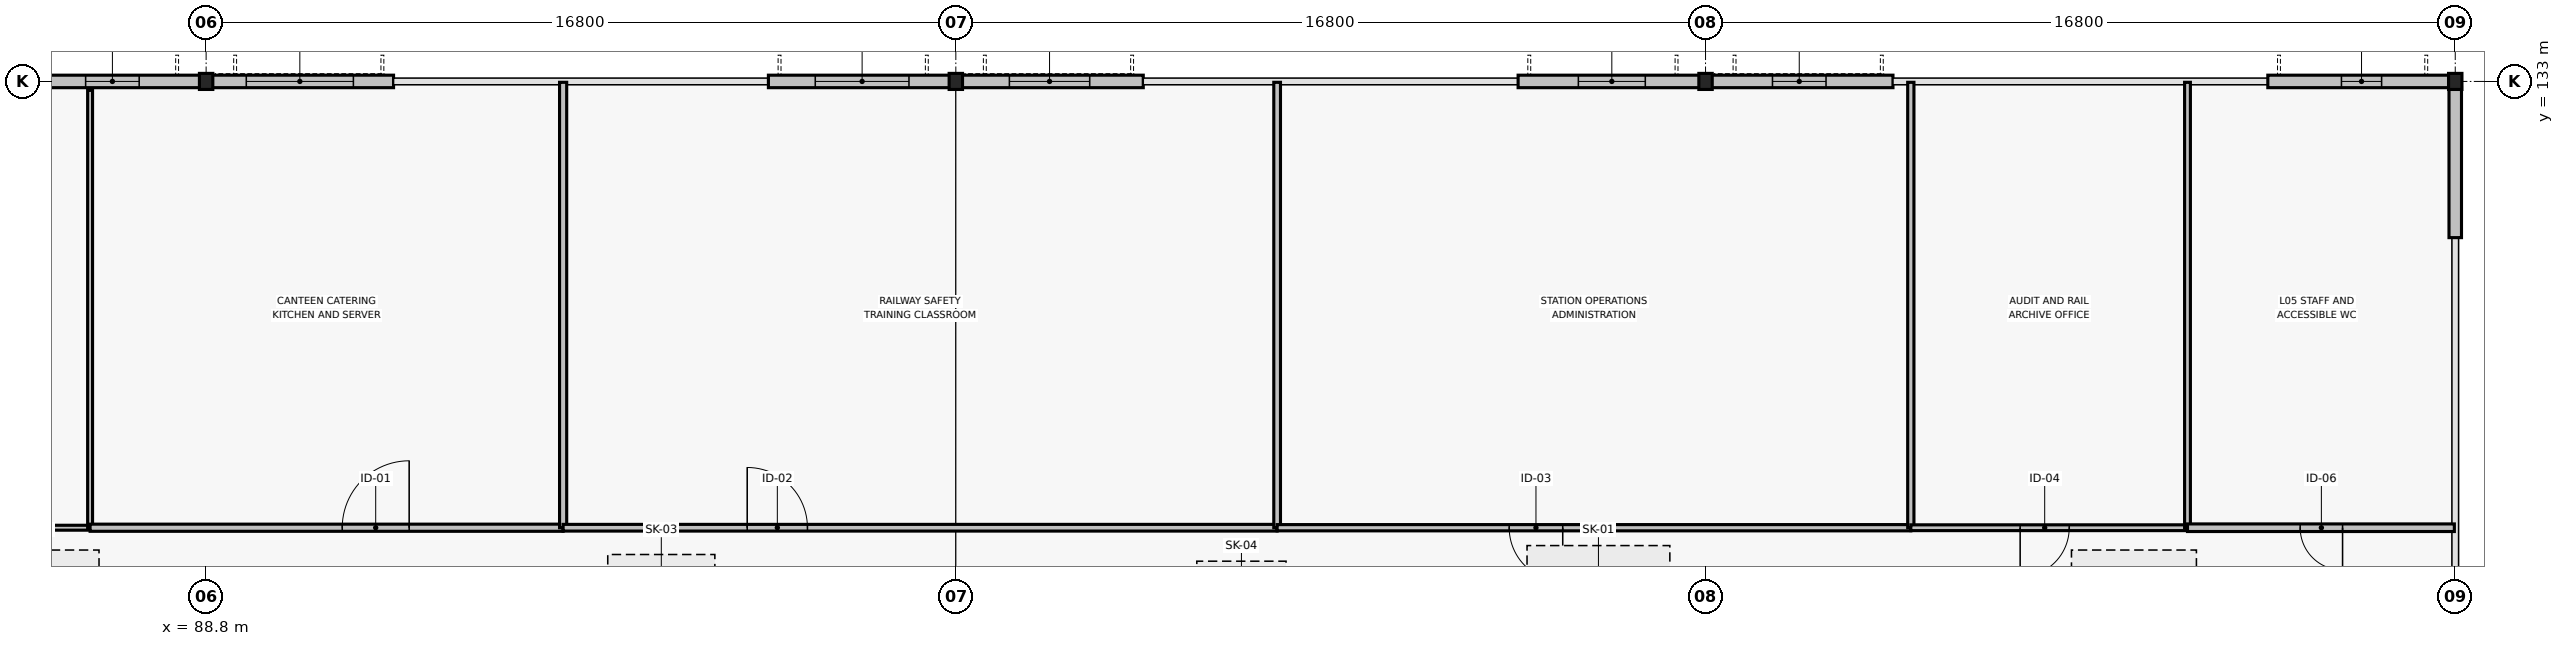
"""IFC4 building model, lengths in metres.
Left out: names, types, materials, properties, quantities, classifications, styles, units other than length and angle.
Written with IfcOpenShell. Run it as: python <this file> out.ifc"""

import sys

from ifc_helpers import new_model, si_unit, direction, frame, frame_2d, origin, origin_2d, place, context, subcontext, project, spatial, rectangle, i_section, extrude, element, fill, save


model = new_model("IFC4")
c1 = context("Model", 3, precision=1e-05, world=origin(), true_north=direction((0.0, 1.0)))
c2 = subcontext(c1, "Body", "Model", "MODEL_VIEW")
j1 = project(units=[si_unit("LENGTHUNIT", "METRE"), si_unit("PLANEANGLEUNIT", "RADIAN")], contexts=[c1])
p1 = place(None, origin())
s1 = spatial("IfcSite", under=j1, at=p1, CompositionType="ELEMENT")
p2 = place(p1, origin())
s2 = spatial("IfcBuilding", under=s1, at=p2, CompositionType="ELEMENT")
p3 = place(p2, frame((0.0, 0.0, 24.9)))
s3 = spatial("IfcBuildingStorey", under=s2, at=p3, CompositionType="ELEMENT", Elevation=24.9)
for number, where, z_axis, x_axis in (
    (1, (88.8, 133.0, 0.0), (0.0, 0.0, 1.0), (1.0, 0.0, 0.0)),
    (2, (105.6, 133.0, 0.0), (0.0, 0.0, 1.0), (1.0, 0.0, 0.0)),
    (3, (122.4, 133.0, 0.0), (0.0, 0.0, 1.0), (1.0, 0.0, 0.0)),
    (4, (139.2, 133.0, 0.0), (0.0, 0.0, 1.0), (1.0, 0.0, 0.0)),
):
    element("IfcColumn", number, at=place(p3, frame(where, z_axis=z_axis, x_axis=x_axis)), inside=s3, PredefinedType="COLUMN", context=c2, shape_type="SweptSolid", body=[
        extrude(i_section(OverallWidth=0.3, OverallDepth=0.36, WebThickness=0.012, FlangeThickness=0.022, FilletRadius=0.027, at=origin_2d()), origin(), (0.0, 0.0, 1.0), 3.9),
    ])
p4 = place(p3, frame((84.6, 133.0, 0.0), z_axis=(0.0, 0.0, 1.0), x_axis=(1.0, 0.0, 0.0)))
e5 = element("IfcWall", 5, at=p4, inside=s3, PredefinedType="STANDARD", context=c2, shape_type="SweptSolid", body=[
    extrude(rectangle(XDim=4.2, YDim=0.28, at=frame_2d((2.1, 0.0))), origin(), (0.0, 0.0, 1.0), 3.3),
])
p5 = place(p4, frame((1.5, 0.0, 0.8)))
e6 = element("IfcOpeningElement", 6, at=p5, cuts=e5, PredefinedType="OPENING", context=c2, shape_type="SweptSolid", body=[
    extrude(rectangle(XDim=1.2, YDim=1.9, at=frame_2d((0.6, 0.95))), frame((0.0, 0.15, 0.0), z_axis=(0.0, -1.0, 0.0), x_axis=(1.0, 0.0, 0.0)), (0.0, 0.0, 1.0), 0.3),
])
p6 = place(p3, frame((88.8, 133.0, 0.0), z_axis=(0.0, 0.0, 1.0), x_axis=(1.0, 0.0, 0.0)))
e7 = element("IfcWall", 7, at=p6, inside=s3, PredefinedType="STANDARD", context=c2, shape_type="SweptSolid", body=[
    extrude(rectangle(XDim=4.2, YDim=0.28, at=frame_2d((2.1, 0.0))), origin(), (0.0, 0.0, 1.0), 3.3),
])
p7 = place(p6, frame((0.9, 0.0, 0.8)))
e8 = element("IfcOpeningElement", 8, at=p7, cuts=e7, PredefinedType="OPENING", context=c2, shape_type="SweptSolid", body=[
    extrude(rectangle(XDim=2.4, YDim=1.75, at=frame_2d((1.2, 0.875))), frame((0.0, 0.15, 0.0), z_axis=(0.0, -1.0, 0.0), x_axis=(1.0, 0.0, 0.0)), (0.0, 0.0, 1.0), 0.3),
])
p8 = place(p3, frame((101.4, 133.0, 0.0), z_axis=(0.0, 0.0, 1.0), x_axis=(1.0, 0.0, 0.0)))
e9 = element("IfcWall", 9, at=p8, inside=s3, PredefinedType="STANDARD", context=c2, shape_type="SweptSolid", body=[
    extrude(rectangle(XDim=4.2, YDim=0.28, at=frame_2d((2.1, 0.0))), origin(), (0.0, 0.0, 1.0), 3.3),
])
p9 = place(p8, frame((1.05, 0.0, 0.8)))
e10 = element("IfcOpeningElement", 10, at=p9, cuts=e9, PredefinedType="OPENING", context=c2, shape_type="SweptSolid", body=[
    extrude(rectangle(XDim=2.1, YDim=1.75, at=frame_2d((1.05, 0.875))), frame((0.0, 0.15, 0.0), z_axis=(0.0, -1.0, 0.0), x_axis=(1.0, 0.0, 0.0)), (0.0, 0.0, 1.0), 0.3),
])
p10 = place(p3, frame((105.6, 133.0, 0.0), z_axis=(0.0, 0.0, 1.0), x_axis=(1.0, 0.0, 0.0)))
e11 = element("IfcWall", 11, at=p10, inside=s3, PredefinedType="STANDARD", context=c2, shape_type="SweptSolid", body=[
    extrude(rectangle(XDim=4.2, YDim=0.28, at=frame_2d((2.1, 0.0))), origin(), (0.0, 0.0, 1.0), 3.3),
])
p11 = place(p10, frame((1.2, 0.0, 0.8)))
e12 = element("IfcOpeningElement", 12, at=p11, cuts=e11, PredefinedType="OPENING", context=c2, shape_type="SweptSolid", body=[
    extrude(rectangle(XDim=1.8, YDim=1.75, at=frame_2d((0.9, 0.875))), frame((0.0, 0.15, 0.0), z_axis=(0.0, -1.0, 0.0), x_axis=(1.0, 0.0, 0.0)), (0.0, 0.0, 1.0), 0.3),
])
p12 = place(p3, frame((118.2, 133.0, 0.0), z_axis=(0.0, 0.0, 1.0), x_axis=(1.0, 0.0, 0.0)))
e13 = element("IfcWall", 13, at=p12, inside=s3, PredefinedType="STANDARD", context=c2, shape_type="SweptSolid", body=[
    extrude(rectangle(XDim=4.2, YDim=0.28, at=frame_2d((2.1, 0.0))), origin(), (0.0, 0.0, 1.0), 3.3),
])
p13 = place(p12, frame((1.35, 0.0, 0.8)))
e14 = element("IfcOpeningElement", 14, at=p13, cuts=e13, PredefinedType="OPENING", context=c2, shape_type="SweptSolid", body=[
    extrude(rectangle(XDim=1.5, YDim=1.75, at=frame_2d((0.75, 0.875))), frame((0.0, 0.15, 0.0), z_axis=(0.0, -1.0, 0.0), x_axis=(1.0, 0.0, 0.0)), (0.0, 0.0, 1.0), 0.3),
])
p14 = place(p3, frame((122.4, 133.0, 0.0), z_axis=(0.0, 0.0, 1.0), x_axis=(1.0, 0.0, 0.0)))
e15 = element("IfcWall", 15, at=p14, inside=s3, PredefinedType="STANDARD", context=c2, shape_type="SweptSolid", body=[
    extrude(rectangle(XDim=4.2, YDim=0.28, at=frame_2d((2.1, 0.0))), origin(), (0.0, 0.0, 1.0), 3.3),
])
p15 = place(p14, frame((1.5, 0.0, 0.8)))
e16 = element("IfcOpeningElement", 16, at=p15, cuts=e15, PredefinedType="OPENING", context=c2, shape_type="SweptSolid", body=[
    extrude(rectangle(XDim=1.2, YDim=1.75, at=frame_2d((0.6, 0.875))), frame((0.0, 0.15, 0.0), z_axis=(0.0, -1.0, 0.0), x_axis=(1.0, 0.0, 0.0)), (0.0, 0.0, 1.0), 0.3),
])
p16 = place(p3, frame((135.0, 133.0, 0.0), z_axis=(0.0, 0.0, 1.0), x_axis=(1.0, 0.0, 0.0)))
e17 = element("IfcWall", 17, at=p16, inside=s3, PredefinedType="STANDARD", context=c2, shape_type="SweptSolid", body=[
    extrude(rectangle(XDim=4.2, YDim=0.28, at=frame_2d((2.1, 0.0))), origin(), (0.0, 0.0, 1.0), 3.3),
])
p17 = place(p16, frame((1.65, 0.0, 0.8)))
e18 = element("IfcOpeningElement", 18, at=p17, cuts=e17, PredefinedType="OPENING", context=c2, shape_type="SweptSolid", body=[
    extrude(rectangle(XDim=0.9, YDim=1.75, at=frame_2d((0.45, 0.875))), frame((0.0, 0.15, 0.0), z_axis=(0.0, -1.0, 0.0), x_axis=(1.0, 0.0, 0.0)), (0.0, 0.0, 1.0), 0.3),
])
p18 = place(p3, frame((139.2, 129.5, 0.0), z_axis=(0.0, 0.0, 1.0), x_axis=(0.0, 1.0, 0.0)))
e19 = element("IfcWall", 19, at=p18, inside=s3, PredefinedType="STANDARD", context=c2, shape_type="SweptSolid", body=[
    extrude(rectangle(XDim=3.36, YDim=0.28, at=frame_2d((1.68, 0.0))), origin(), (0.0, 0.0, 1.0), 3.3),
])
p19 = place(p3, frame((72.2, 123.0, 0.0), z_axis=(0.0, 0.0, 1.0), x_axis=(1.0, 0.0, 0.0)))
e20 = element("IfcWall", 20, at=p19, inside=s3, PredefinedType="MOVABLE", context=c2, shape_type="SweptSolid", body=[
    extrude(rectangle(XDim=14.0, YDim=0.11, at=frame_2d((7.0, 0.0))), origin(), (0.0, 0.0, 1.0), 3.695),
])
p20 = place(p19, frame((6.36, 0.0, 0.0)))
e21 = element("IfcOpeningElement", 21, at=p20, cuts=e20, PredefinedType="OPENING", context=c2, shape_type="SweptSolid", body=[
    extrude(rectangle(XDim=1.28, YDim=2.22, at=frame_2d((0.64, 1.11))), frame((0.0, 0.065, 0.0), z_axis=(0.0, -1.0, 0.0), x_axis=(1.0, 0.0, 0.0)), (0.0, 0.0, 1.0), 0.13),
])
p21 = place(p3, frame((86.2, 123.0, 0.0), z_axis=(0.0, 0.0, 1.0), x_axis=(0.0, 1.0, 0.0)))
e22 = element("IfcWall", 22, at=p21, inside=s3, PredefinedType="MOVABLE", context=c2, shape_type="SweptSolid", body=[
    extrude(rectangle(XDim=9.8, YDim=0.11, at=frame_2d((4.9, 0.0))), origin(), (0.0, 0.0, 1.0), 3.695),
])
p22 = place(p3, frame((86.2, 123.0, 0.0), z_axis=(0.0, 0.0, 1.0), x_axis=(1.0, 0.0, 0.0)))
e23 = element("IfcWall", 23, at=p22, inside=s3, PredefinedType="PARTITIONING", context=c2, shape_type="SweptSolid", body=[
    extrude(rectangle(XDim=10.6, YDim=0.16, at=frame_2d((5.3, 0.0))), origin(), (0.0, 0.0, 1.0), 3.695),
])
p23 = place(p22, frame((7.15, 0.0, 0.0), z_axis=(0.0, 0.0, 1.0), x_axis=(-1.0, 0.0, 0.0)))
e24 = element("IfcOpeningElement", 24, at=p23, cuts=e23, PredefinedType="OPENING", context=c2, shape_type="SweptSolid", body=[
    extrude(rectangle(XDim=1.5, YDim=2.25, at=frame_2d((0.75, 1.125))), frame((0.0, 0.09, 0.0), z_axis=(0.0, -1.0, 0.0), x_axis=(1.0, 0.0, 0.0)), (0.0, 0.0, 1.0), 0.18),
])
p24 = place(p3, frame((96.8, 123.0, 0.0), z_axis=(0.0, 0.0, 1.0), x_axis=(0.0, 1.0, 0.0)))
e25 = element("IfcWall", 25, at=p24, inside=s3, PredefinedType="PARTITIONING", context=c2, shape_type="SweptSolid", body=[
    extrude(rectangle(XDim=9.98, YDim=0.16, at=frame_2d((4.99, 0.0))), origin(), (0.0, 0.0, 1.0), 3.695),
])
p25 = place(p3, frame((96.8, 123.0, 0.0), z_axis=(0.0, 0.0, 1.0), x_axis=(1.0, 0.0, 0.0)))
e26 = element("IfcWall", 26, at=p25, inside=s3, PredefinedType="PARTITIONING", context=c2, shape_type="SweptSolid", body=[
    extrude(rectangle(XDim=16.0, YDim=0.15, at=frame_2d((8.0, 0.0))), origin(), (0.0, 0.0, 1.0), 3.695),
])
p26 = place(p25, frame((4.125, 0.0, 0.0)))
e27 = element("IfcOpeningElement", 27, at=p26, cuts=e26, PredefinedType="OPENING", context=c2, shape_type="SweptSolid", body=[
    extrude(rectangle(XDim=1.35, YDim=2.2, at=frame_2d((0.675, 1.1))), frame((0.0, 0.085, 0.0), z_axis=(0.0, -1.0, 0.0), x_axis=(1.0, 0.0, 0.0)), (0.0, 0.0, 1.0), 0.17),
])
p27 = place(p3, frame((112.8, 123.0, 0.0), z_axis=(0.0, 0.0, 1.0), x_axis=(0.0, 1.0, 0.0)))
e28 = element("IfcWall", 28, at=p27, inside=s3, PredefinedType="PARTITIONING", context=c2, shape_type="SweptSolid", body=[
    extrude(rectangle(XDim=9.98, YDim=0.15, at=frame_2d((4.99, 0.0))), origin(), (0.0, 0.0, 1.0), 3.695),
])
p28 = place(p3, frame((112.8, 123.0, 0.0), z_axis=(0.0, 0.0, 1.0), x_axis=(1.0, 0.0, 0.0)))
e29 = element("IfcWall", 29, at=p28, inside=s3, PredefinedType="PARTITIONING", context=c2, shape_type="SweptSolid", body=[
    extrude(rectangle(XDim=14.2, YDim=0.14, at=frame_2d((7.1, 0.0))), origin(), (0.0, 0.0, 1.0), 3.695),
])
p29 = place(p28, frame((5.2, 0.0, 0.0)))
e30 = element("IfcOpeningElement", 30, at=p29, cuts=e29, PredefinedType="OPENING", context=c2, shape_type="SweptSolid", body=[
    extrude(rectangle(XDim=1.2, YDim=2.2, at=frame_2d((0.6, 1.1))), frame((0.0, 0.08, 0.0), z_axis=(0.0, -1.0, 0.0), x_axis=(1.0, 0.0, 0.0)), (0.0, 0.0, 1.0), 0.16),
])
p30 = place(p3, frame((127.0, 123.0, 0.0), z_axis=(0.0, 0.0, 1.0), x_axis=(0.0, 1.0, 0.0)))
e31 = element("IfcWall", 31, at=p30, inside=s3, PredefinedType="PARTITIONING", context=c2, shape_type="SweptSolid", body=[
    extrude(rectangle(XDim=9.98, YDim=0.14, at=frame_2d((4.99, 0.0))), origin(), (0.0, 0.0, 1.0), 3.695),
])
p31 = place(p3, frame((127.0, 123.0, 0.0), z_axis=(0.0, 0.0, 1.0), x_axis=(1.0, 0.0, 0.0)))
e32 = element("IfcWall", 32, at=p31, inside=s3, PredefinedType="PARTITIONING", context=c2, shape_type="SweptSolid", body=[
    extrude(rectangle(XDim=6.2, YDim=0.13, at=frame_2d((3.1, 0.0))), origin(), (0.0, 0.0, 1.0), 3.695),
])
p32 = place(p31, frame((3.55, 0.0, 0.0), z_axis=(0.0, 0.0, 1.0), x_axis=(-1.0, 0.0, 0.0)))
e33 = element("IfcOpeningElement", 33, at=p32, cuts=e32, PredefinedType="OPENING", context=c2, shape_type="SweptSolid", body=[
    extrude(rectangle(XDim=1.1, YDim=2.15, at=frame_2d((0.55, 1.075))), frame((0.0, 0.075, 0.0), z_axis=(0.0, -1.0, 0.0), x_axis=(1.0, 0.0, 0.0)), (0.0, 0.0, 1.0), 0.15),
])
p33 = place(p3, frame((133.2, 123.0, 0.0), z_axis=(0.0, 0.0, 1.0), x_axis=(0.0, 1.0, 0.0)))
e34 = element("IfcWall", 34, at=p33, inside=s3, PredefinedType="PARTITIONING", context=c2, shape_type="SweptSolid", body=[
    extrude(rectangle(XDim=9.98, YDim=0.13, at=frame_2d((4.99, 0.0))), origin(), (0.0, 0.0, 1.0), 3.36),
])
p34 = place(p3, frame((133.2, 123.0, 0.0), z_axis=(0.0, 0.0, 1.0), x_axis=(1.0, 0.0, 0.0)))
e35 = element("IfcWall", 35, at=p34, inside=s3, PredefinedType="PLUMBINGWALL", context=c2, shape_type="SweptSolid", body=[
    extrude(rectangle(XDim=5.98, YDim=0.17, at=frame_2d((2.99, 0.0))), origin(), (0.0, 0.0, 1.0), 3.695),
])
p35 = place(p34, frame((2.525, 0.0, 0.0)))
e36 = element("IfcOpeningElement", 36, at=p35, cuts=e35, PredefinedType="OPENING", context=c2, shape_type="SweptSolid", body=[
    extrude(rectangle(XDim=0.95, YDim=2.15, at=frame_2d((0.475, 1.075))), frame((0.0, 0.095, 0.0), z_axis=(0.0, -1.0, 0.0), x_axis=(1.0, 0.0, 0.0)), (0.0, 0.0, 1.0), 0.19),
])
p36 = place(p5, origin())
e37 = element("IfcWindow", 37, at=p36, inside=s3, PartitioningType="SINGLE_PANEL", PredefinedType="WINDOW", context=c2, shape_type="SweptSolid", body=[
    extrude(rectangle(XDim=1.2, YDim=1.9, at=frame_2d((0.6, 0.95))), frame((0.0, 0.03, 0.0), z_axis=(0.0, -1.0, 0.0), x_axis=(1.0, 0.0, 0.0)), (0.0, 0.0, 1.0), 0.06),
])
fill(e6, e37)
p37 = place(p7, origin())
e38 = element("IfcWindow", 38, at=p37, inside=s3, PartitioningType="SINGLE_PANEL", PredefinedType="WINDOW", context=c2, shape_type="SweptSolid", body=[
    extrude(rectangle(XDim=2.4, YDim=1.75, at=frame_2d((1.2, 0.875))), frame((0.0, 0.03, 0.0), z_axis=(0.0, -1.0, 0.0), x_axis=(1.0, 0.0, 0.0)), (0.0, 0.0, 1.0), 0.06),
])
fill(e8, e38)
p38 = place(p9, origin())
e39 = element("IfcWindow", 39, at=p38, inside=s3, PartitioningType="SINGLE_PANEL", PredefinedType="WINDOW", context=c2, shape_type="SweptSolid", body=[
    extrude(rectangle(XDim=2.1, YDim=1.75, at=frame_2d((1.05, 0.875))), frame((0.0, 0.03, 0.0), z_axis=(0.0, -1.0, 0.0), x_axis=(1.0, 0.0, 0.0)), (0.0, 0.0, 1.0), 0.06),
])
fill(e10, e39)
p39 = place(p11, origin())
e40 = element("IfcWindow", 40, at=p39, inside=s3, PartitioningType="SINGLE_PANEL", PredefinedType="WINDOW", context=c2, shape_type="SweptSolid", body=[
    extrude(rectangle(XDim=1.8, YDim=1.75, at=frame_2d((0.9, 0.875))), frame((0.0, 0.03, 0.0), z_axis=(0.0, -1.0, 0.0), x_axis=(1.0, 0.0, 0.0)), (0.0, 0.0, 1.0), 0.06),
])
fill(e12, e40)
p40 = place(p13, origin())
e41 = element("IfcWindow", 41, at=p40, inside=s3, PartitioningType="SINGLE_PANEL", PredefinedType="WINDOW", context=c2, shape_type="SweptSolid", body=[
    extrude(rectangle(XDim=1.5, YDim=1.75, at=frame_2d((0.75, 0.875))), frame((0.0, 0.03, 0.0), z_axis=(0.0, -1.0, 0.0), x_axis=(1.0, 0.0, 0.0)), (0.0, 0.0, 1.0), 0.06),
])
fill(e14, e41)
p41 = place(p15, origin())
e42 = element("IfcWindow", 42, at=p41, inside=s3, PartitioningType="SINGLE_PANEL", PredefinedType="WINDOW", context=c2, shape_type="SweptSolid", body=[
    extrude(rectangle(XDim=1.2, YDim=1.75, at=frame_2d((0.6, 0.875))), frame((0.0, 0.03, 0.0), z_axis=(0.0, -1.0, 0.0), x_axis=(1.0, 0.0, 0.0)), (0.0, 0.0, 1.0), 0.06),
])
fill(e16, e42)
p42 = place(p17, origin())
e43 = element("IfcWindow", 43, at=p42, inside=s3, PartitioningType="SINGLE_PANEL", PredefinedType="WINDOW", context=c2, shape_type="SweptSolid", body=[
    extrude(rectangle(XDim=0.9, YDim=1.75, at=frame_2d((0.45, 0.875))), frame((0.0, 0.03, 0.0), z_axis=(0.0, -1.0, 0.0), x_axis=(1.0, 0.0, 0.0)), (0.0, 0.0, 1.0), 0.06),
])
fill(e18, e43)
p43 = place(p2, frame((0.0, 0.0, 28.8)))
p44 = place(p43, frame((0.0, 0.0, -0.205)))
p45 = place(p44, frame((85.0, 121.5, 0.0)))
p46 = place(p45, frame((0.0, 0.0, 0.155)))
e44 = element("IfcWindow", 44, at=p46, inside=s3, PartitioningType="SINGLE_PANEL", PredefinedType="SKYLIGHT", context=c2, shape_type="SweptSolid", body=[
    extrude(rectangle(XDim=2.8, YDim=2.0, at=origin_2d()), origin(), (0.0, 0.0, 1.0), 0.05),
])
p47 = place(p44, frame((99.0, 121.5, 0.0)))
p48 = place(p47, frame((0.0, 0.0, 0.155)))
e45 = element("IfcWindow", 45, at=p48, inside=s3, PartitioningType="SINGLE_PANEL", PredefinedType="SKYLIGHT", context=c2, shape_type="SweptSolid", body=[
    extrude(rectangle(XDim=2.4, YDim=1.8, at=origin_2d()), origin(), (0.0, 0.0, 1.0), 0.05),
])
p49 = place(p43, frame((0.0, 0.0, -0.205)))
p50 = place(p49, frame((112.0, 121.5, 0.0)))
p51 = place(p50, frame((0.0, 0.0, 0.155)))
e46 = element("IfcWindow", 46, at=p51, inside=s3, PartitioningType="SINGLE_PANEL", PredefinedType="SKYLIGHT", context=c2, shape_type="SweptSolid", body=[
    extrude(rectangle(XDim=2.0, YDim=1.5, at=origin_2d()), origin(), (0.0, 0.0, 1.0), 0.05),
])
p52 = place(p49, frame((120.0, 121.5, 0.0)))
p53 = place(p52, frame((0.0, 0.0, 0.155)))
e47 = element("IfcWindow", 47, at=p53, inside=s3, PartitioningType="SINGLE_PANEL", PredefinedType="SKYLIGHT", context=c2, shape_type="SweptSolid", body=[
    extrude(rectangle(XDim=3.2, YDim=2.2, at=origin_2d()), origin(), (0.0, 0.0, 1.0), 0.05),
])
p54 = place(p49, frame((132.0, 121.5, 0.0)))
p55 = place(p54, frame((0.0, 0.0, 0.155)))
e48 = element("IfcWindow", 48, at=p55, inside=s3, PartitioningType="SINGLE_PANEL", PredefinedType="SKYLIGHT", context=c2, shape_type="SweptSolid", body=[
    extrude(rectangle(XDim=2.8, YDim=2.0, at=origin_2d()), origin(), (0.0, 0.0, 1.0), 0.05),
])
p56 = place(p23, origin())
e49 = element("IfcDoor", 49, at=p56, inside=s3, OperationType="SINGLE_SWING_RIGHT", PredefinedType="DOOR", context=c2, shape_type="SweptSolid", body=[
    extrude(rectangle(XDim=1.5, YDim=2.25, at=frame_2d((0.75, 1.125))), frame((0.0, 0.025, 0.0), z_axis=(0.0, -1.0, 0.0), x_axis=(1.0, 0.0, 0.0)), (0.0, 0.0, 1.0), 0.05),
])
fill(e24, e49)
p57 = place(p26, origin())
e50 = element("IfcDoor", 50, at=p57, inside=s3, OperationType="SINGLE_SWING_LEFT", PredefinedType="DOOR", context=c2, shape_type="SweptSolid", body=[
    extrude(rectangle(XDim=1.35, YDim=2.2, at=frame_2d((0.675, 1.1))), frame((0.0, 0.025, 0.0), z_axis=(0.0, -1.0, 0.0), x_axis=(1.0, 0.0, 0.0)), (0.0, 0.0, 1.0), 0.05),
])
fill(e27, e50)
p58 = place(p29, origin())
e51 = element("IfcDoor", 51, at=p58, inside=s3, OperationType="SINGLE_SWING_RIGHT", PredefinedType="DOOR", context=c2, shape_type="SweptSolid", body=[
    extrude(rectangle(XDim=1.2, YDim=2.2, at=frame_2d((0.6, 1.1))), frame((0.0, 0.025, 0.0), z_axis=(0.0, -1.0, 0.0), x_axis=(1.0, 0.0, 0.0)), (0.0, 0.0, 1.0), 0.05),
])
fill(e30, e51)
p59 = place(p32, origin())
e52 = element("IfcDoor", 52, at=p59, inside=s3, OperationType="SINGLE_SWING_LEFT", PredefinedType="DOOR", context=c2, shape_type="SweptSolid", body=[
    extrude(rectangle(XDim=1.1, YDim=2.15, at=frame_2d((0.55, 1.075))), frame((0.0, 0.025, 0.0), z_axis=(0.0, -1.0, 0.0), x_axis=(1.0, 0.0, 0.0)), (0.0, 0.0, 1.0), 0.05),
])
fill(e33, e52)
p60 = place(p35, origin())
e53 = element("IfcDoor", 53, at=p60, inside=s3, OperationType="SINGLE_SWING_RIGHT", PredefinedType="DOOR", context=c2, shape_type="SweptSolid", body=[
    extrude(rectangle(XDim=0.95, YDim=2.15, at=frame_2d((0.475, 1.075))), frame((0.0, 0.025, 0.0), z_axis=(0.0, -1.0, 0.0), x_axis=(1.0, 0.0, 0.0)), (0.0, 0.0, 1.0), 0.05),
])
fill(e36, e53)
save(model, sys.argv[1])
